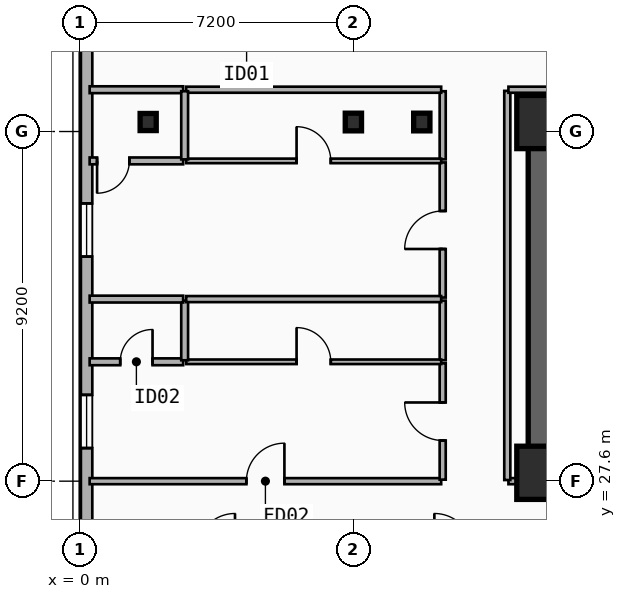
"""IFC4 building model, lengths in metres.
Left out: names, types, materials, properties, quantities, classifications, styles, units other than length and angle.
Written with IfcOpenShell. Run it as: python <this file> out.ifc"""

import sys

from ifc_helpers import new_model, si_unit, direction, frame, frame_2d, origin, origin_2d, place, context, subcontext, project, spatial, rectangle, i_section, extrude, element, fill, save


model = new_model("IFC4")
c1 = context("Model", 3, precision=1e-05, world=origin(), true_north=direction((0.0, 1.0)))
c2 = subcontext(c1, "Body", "Model", "MODEL_VIEW")
j1 = project(units=[si_unit("LENGTHUNIT", "METRE"), si_unit("PLANEANGLEUNIT", "RADIAN")], contexts=[c1])
p1 = place(None, origin())
s1 = spatial("IfcSite", under=j1, at=p1, CompositionType="ELEMENT")
p2 = place(p1, origin())
s2 = spatial("IfcBuilding", under=s1, at=p2, CompositionType="ELEMENT")
p3 = place(p2, frame((0.0, 0.0, 36.0)))
s3 = spatial("IfcBuildingStorey", under=s2, at=p3, CompositionType="ELEMENT", Elevation=36.0)
p4 = place(p3, frame((12.15, 37.05, 0.0), z_axis=(0.0, 0.0, 1.0), x_axis=(1.0, 0.0, 0.0)))
e1 = element("IfcWall", 1, at=p4, inside=s3, PredefinedType="SHEAR", context=c2, shape_type="SweptSolid", body=[
    extrude(rectangle(XDim=33.23, YDim=0.7, at=frame_2d((16.615, 0.0))), origin(), (0.0, 0.0, 1.0), 3.5),
])
p5 = place(p3, frame((21.18, 27.82, 0.0), z_axis=(0.0, 0.0, 1.0), x_axis=(-1.0, 0.0, 0.0)))
e2 = element("IfcWall", 2, at=p5, inside=s3, PredefinedType="SHEAR", context=c2, shape_type="SweptSolid", body=[
    extrude(rectangle(XDim=9.03, YDim=0.7, at=frame_2d((4.515, 0.0))), origin(), (0.0, 0.0, 1.0), 3.5),
])
p6 = place(p5, frame((2.68, 0.0, 0.0)))
e3 = element("IfcOpeningElement", 3, at=p6, cuts=e2, PredefinedType="OPENING", context=c2, shape_type="SweptSolid", body=[
    extrude(rectangle(XDim=1.1, YDim=2.15, at=frame_2d((0.55, 1.075))), frame((0.0, 0.36, 0.0), z_axis=(0.0, -1.0, 0.0), x_axis=(1.0, 0.0, 0.0)), (0.0, 0.0, 1.0), 0.72),
])
p7 = place(p3, frame((12.15, 28.17, 0.0), z_axis=(0.0, 0.0, 1.0), x_axis=(0.0, 1.0, 0.0)))
e4 = element("IfcWall", 4, at=p7, inside=s3, PredefinedType="SHEAR", context=c2, shape_type="SweptSolid", body=[
    extrude(rectangle(XDim=8.53, YDim=0.7, at=frame_2d((4.265, 0.0))), origin(), (0.0, 0.0, 1.0), 3.5),
])
for number, where, z_axis, x_axis in (
    (5, (12.2, 27.82, 0.0), (0.0, 0.0, 1.0), (1.0, 0.0, 0.0)),
    (6, (12.2, 37.05, 0.0), (0.0, 0.0, 1.0), (1.0, 0.0, 0.0)),
):
    element("IfcColumn", number, at=place(p3, frame(where, z_axis=z_axis, x_axis=x_axis)), inside=s3, PredefinedType="COLUMN", context=c2, shape_type="SweptSolid", body=[
        extrude(rectangle(XDim=1.4, YDim=1.4, at=origin_2d()), origin(), (0.0, 0.0, 1.0), 3.5),
    ])
p8 = place(p3, frame((9.0, 37.05, 0.0), z_axis=(0.0, 0.0, 1.0), x_axis=(1.0, 0.0, 0.0)))
e7 = element("IfcColumn", 7, at=p8, inside=s3, PredefinedType="COLUMN", context=c2, shape_type="SweptSolid", body=[
    extrude(i_section(OverallWidth=0.428, OverallDepth=0.465, WebThickness=0.045, FlangeThickness=0.073, FilletRadius=0.015, at=origin_2d()), origin(), (0.0, 0.0, 1.0), 3.5),
])
p9 = place(p3, frame((1.8, 37.05, 0.0), z_axis=(0.0, 0.0, 1.0), x_axis=(1.0, 0.0, 0.0)))
e8 = element("IfcColumn", 8, at=p9, inside=s3, PredefinedType="COLUMN", context=c2, shape_type="SweptSolid", body=[
    extrude(i_section(OverallWidth=0.424, OverallDepth=0.45, WebThickness=0.041, FlangeThickness=0.065, FilletRadius=0.015, at=origin_2d()), origin(), (0.0, 0.0, 1.0), 3.5),
])
p10 = place(p3, frame((7.2, 37.05, 0.0), z_axis=(0.0, 0.0, 1.0), x_axis=(1.0, 0.0, 0.0)))
e9 = element("IfcColumn", 9, at=p10, inside=s3, PredefinedType="COLUMN", context=c2, shape_type="SweptSolid", body=[
    extrude(i_section(OverallWidth=0.428, OverallDepth=0.465, WebThickness=0.045, FlangeThickness=0.073, FilletRadius=0.015, at=origin_2d()), origin(), (0.0, 0.0, 1.0), 3.5),
])
p11 = place(p3, frame((0.18, 25.8, 0.0), z_axis=(0.0, 0.0, 1.0), x_axis=(0.0, 1.0, 0.0)))
e10 = element("IfcWall", 10, at=p11, inside=s3, PredefinedType="SOLIDWALL", context=c2, shape_type="SweptSolid", body=[
    extrude(rectangle(XDim=15.2, YDim=0.3, at=frame_2d((7.6, 0.0))), origin(), (0.0, 0.0, 1.0), 3.24),
])
p12 = place(p11, frame((2.67, 0.0, 0.48)))
e11 = element("IfcOpeningElement", 11, at=p12, cuts=e10, PredefinedType="OPENING", context=c2, shape_type="SweptSolid", body=[
    extrude(rectangle(XDim=1.4, YDim=1.8, at=frame_2d((0.7, 0.9))), frame((0.0, 0.16, 0.0), z_axis=(0.0, -1.0, 0.0), x_axis=(1.0, 0.0, 0.0)), (0.0, 0.0, 1.0), 0.32),
])
p13 = place(p11, frame((7.709, 0.0, 0.48)))
e12 = element("IfcOpeningElement", 12, at=p13, cuts=e10, PredefinedType="OPENING", context=c2, shape_type="SweptSolid", body=[
    extrude(rectangle(XDim=1.4, YDim=1.8, at=frame_2d((0.7, 0.9))), frame((0.0, 0.16, 0.0), z_axis=(0.0, -1.0, 0.0), x_axis=(1.0, 0.0, 0.0)), (0.0, 0.0, 1.0), 0.32),
])
p14 = place(p3, frame((0.26, 27.6, 0.0), z_axis=(0.0, 0.0, 1.0), x_axis=(1.0, 0.0, 0.0)))
e13 = element("IfcWall", 13, at=p14, inside=s3, PredefinedType="PARTITIONING", context=c2, shape_type="SweptSolid", body=[
    extrude(rectangle(XDim=9.25, YDim=0.16, at=frame_2d((4.625, 0.0))), origin(), (0.0, 0.0, 1.0), 2.57),
])
p15 = place(p14, frame((4.125, 0.0, 0.0)))
e14 = element("IfcOpeningElement", 14, at=p15, cuts=e13, PredefinedType="OPENING", context=c2, shape_type="SweptSolid", body=[
    extrude(rectangle(XDim=1.0, YDim=2.15, at=frame_2d((0.5, 1.075))), frame((0.0, 0.09, 0.0), z_axis=(0.0, -1.0, 0.0), x_axis=(1.0, 0.0, 0.0)), (0.0, 0.0, 1.0), 0.18),
])
p16 = place(p3, frame((9.55, 27.64, 0.0), z_axis=(0.0, 0.0, 1.0), x_axis=(0.0, 1.0, 0.0)))
e15 = element("IfcWall", 15, at=p16, inside=s3, PredefinedType="PARTITIONING", context=c2, shape_type="SweptSolid", body=[
    extrude(rectangle(XDim=3.061, YDim=0.16, at=frame_2d((1.531, 0.0))), origin(), (0.0, 0.0, 1.0), 3.24),
])
p17 = place(p16, frame((1.031, 0.0, 0.0)))
e16 = element("IfcOpeningElement", 16, at=p17, cuts=e15, PredefinedType="OPENING", context=c2, shape_type="SweptSolid", body=[
    extrude(rectangle(XDim=1.0, YDim=2.15, at=frame_2d((0.5, 1.075))), frame((0.0, 0.09, 0.0), z_axis=(0.0, -1.0, 0.0), x_axis=(1.0, 0.0, 0.0)), (0.0, 0.0, 1.0), 0.18),
])
p18 = place(p3, frame((9.55, 30.781, 0.0), z_axis=(0.0, 0.0, 1.0), x_axis=(0.0, 1.0, 0.0)))
e17 = element("IfcWall", 17, at=p18, inside=s3, PredefinedType="PARTITIONING", context=c2, shape_type="SweptSolid", body=[
    extrude(rectangle(XDim=1.57, YDim=0.16, at=frame_2d((0.785, 0.0))), origin(), (0.0, 0.0, 1.0), 3.24),
])
p19 = place(p3, frame((9.55, 32.431, 0.0), z_axis=(0.0, 0.0, 1.0), x_axis=(0.0, 1.0, 0.0)))
e18 = element("IfcWall", 18, at=p19, inside=s3, PredefinedType="PARTITIONING", context=c2, shape_type="SweptSolid", body=[
    extrude(rectangle(XDim=3.556, YDim=0.16, at=frame_2d((1.778, 0.0))), origin(), (0.0, 0.0, 1.0), 3.24),
])
p20 = place(p19, frame((1.278, 0.0, 0.0)))
e19 = element("IfcOpeningElement", 19, at=p20, cuts=e18, PredefinedType="OPENING", context=c2, shape_type="SweptSolid", body=[
    extrude(rectangle(XDim=1.0, YDim=2.15, at=frame_2d((0.5, 1.075))), frame((0.0, 0.09, 0.0), z_axis=(0.0, -1.0, 0.0), x_axis=(1.0, 0.0, 0.0)), (0.0, 0.0, 1.0), 0.18),
])
p21 = place(p3, frame((9.55, 36.067, 0.0), z_axis=(0.0, 0.0, 1.0), x_axis=(0.0, 1.0, 0.0)))
e20 = element("IfcWall", 20, at=p21, inside=s3, PredefinedType="PARTITIONING", context=c2, shape_type="SweptSolid", body=[
    extrude(rectangle(XDim=1.793, YDim=0.16, at=frame_2d((0.896, 0.0))), origin(), (0.0, 0.0, 1.0), 2.72),
])
p22 = place(p3, frame((0.26, 37.9, 0.0), z_axis=(0.0, 0.0, 1.0), x_axis=(1.0, 0.0, 0.0)))
e21 = element("IfcWall", 21, at=p22, inside=s3, PredefinedType="PLUMBINGWALL", context=c2, shape_type="SweptSolid", body=[
    extrude(rectangle(XDim=2.46, YDim=0.18, at=frame_2d((1.23, 0.0))), origin(), (0.0, 0.0, 1.0), 3.24),
])
p23 = place(p3, frame((2.8, 37.9, 0.0), z_axis=(0.0, 0.0, 1.0), x_axis=(1.0, 0.0, 0.0)))
e22 = element("IfcWall", 22, at=p23, inside=s3, PredefinedType="PARTITIONING", context=c2, shape_type="SweptSolid", body=[
    extrude(rectangle(XDim=6.71, YDim=0.16, at=frame_2d((3.355, 0.0))), origin(), (0.0, 0.0, 1.0), 3.24),
])
p24 = place(p3, frame((0.26, 30.741, 0.0), z_axis=(0.0, 0.0, 1.0), x_axis=(1.0, 0.0, 0.0)))
e23 = element("IfcWall", 23, at=p24, inside=s3, PredefinedType="PLUMBINGWALL", context=c2, shape_type="SweptSolid", body=[
    extrude(rectangle(XDim=2.46, YDim=0.18, at=frame_2d((1.23, 0.0))), origin(), (0.0, 0.0, 1.0), 2.57),
])
p25 = place(p24, frame((0.805, 0.0, 0.0)))
e24 = element("IfcOpeningElement", 24, at=p25, cuts=e23, PredefinedType="OPENING", context=c2, shape_type="SweptSolid", body=[
    extrude(rectangle(XDim=0.85, YDim=2.1, at=frame_2d((0.425, 1.05))), frame((0.0, 0.1, 0.0), z_axis=(0.0, -1.0, 0.0), x_axis=(1.0, 0.0, 0.0)), (0.0, 0.0, 1.0), 0.2),
])
p26 = place(p3, frame((2.8, 30.741, 0.0), z_axis=(0.0, 0.0, 1.0), x_axis=(1.0, 0.0, 0.0)))
e25 = element("IfcWall", 25, at=p26, inside=s3, PredefinedType="PARTITIONING", context=c2, shape_type="SweptSolid", body=[
    extrude(rectangle(XDim=6.71, YDim=0.12, at=frame_2d((3.355, 0.0))), origin(), (0.0, 0.0, 1.0), 2.57),
])
p27 = place(p26, frame((2.905, 0.0, 0.0)))
e26 = element("IfcOpeningElement", 26, at=p27, cuts=e25, PredefinedType="OPENING", context=c2, shape_type="SweptSolid", body=[
    extrude(rectangle(XDim=0.9, YDim=2.1, at=frame_2d((0.45, 1.05))), frame((0.0, 0.07, 0.0), z_axis=(0.0, -1.0, 0.0), x_axis=(1.0, 0.0, 0.0)), (0.0, 0.0, 1.0), 0.14),
])
p28 = place(p3, frame((2.76, 30.781, 0.0), z_axis=(0.0, 0.0, 1.0), x_axis=(0.0, 1.0, 0.0)))
e27 = element("IfcWall", 27, at=p28, inside=s3, PredefinedType="PLUMBINGWALL", context=c2, shape_type="SweptSolid", body=[
    extrude(rectangle(XDim=1.57, YDim=0.18, at=frame_2d((0.785, 0.0))), origin(), (0.0, 0.0, 1.0), 3.24),
])
p29 = place(p3, frame((0.26, 32.391, 0.0), z_axis=(0.0, 0.0, 1.0), x_axis=(1.0, 0.0, 0.0)))
e28 = element("IfcWall", 28, at=p29, inside=s3, PredefinedType="PLUMBINGWALL", context=c2, shape_type="SweptSolid", body=[
    extrude(rectangle(XDim=2.46, YDim=0.18, at=frame_2d((1.23, 0.0))), origin(), (0.0, 0.0, 1.0), 2.57),
])
p30 = place(p3, frame((2.8, 32.391, 0.0), z_axis=(0.0, 0.0, 1.0), x_axis=(1.0, 0.0, 0.0)))
e29 = element("IfcWall", 29, at=p30, inside=s3, PredefinedType="PARTITIONING", context=c2, shape_type="SweptSolid", body=[
    extrude(rectangle(XDim=6.71, YDim=0.16, at=frame_2d((3.355, 0.0))), origin(), (0.0, 0.0, 1.0), 2.57),
])
p31 = place(p3, frame((2.72, 36.027, 0.0), z_axis=(0.0, 0.0, 1.0), x_axis=(-1.0, 0.0, 0.0)))
e30 = element("IfcWall", 30, at=p31, inside=s3, PredefinedType="PLUMBINGWALL", context=c2, shape_type="SweptSolid", body=[
    extrude(rectangle(XDim=2.46, YDim=0.18, at=frame_2d((1.23, 0.0))), origin(), (0.0, 0.0, 1.0), 2.57),
])
p32 = place(p31, frame((1.415, 0.0, 0.0)))
e31 = element("IfcOpeningElement", 31, at=p32, cuts=e30, PredefinedType="OPENING", context=c2, shape_type="SweptSolid", body=[
    extrude(rectangle(XDim=0.85, YDim=2.1, at=frame_2d((0.425, 1.05))), frame((0.0, 0.1, 0.0), z_axis=(0.0, -1.0, 0.0), x_axis=(1.0, 0.0, 0.0)), (0.0, 0.0, 1.0), 0.2),
])
p33 = place(p3, frame((2.8, 36.027, 0.0), z_axis=(0.0, 0.0, 1.0), x_axis=(1.0, 0.0, 0.0)))
e32 = element("IfcWall", 32, at=p33, inside=s3, PredefinedType="PARTITIONING", context=c2, shape_type="SweptSolid", body=[
    extrude(rectangle(XDim=6.71, YDim=0.12, at=frame_2d((3.355, 0.0))), origin(), (0.0, 0.0, 1.0), 2.57),
])
p34 = place(p33, frame((2.905, 0.0, 0.0)))
e33 = element("IfcOpeningElement", 33, at=p34, cuts=e32, PredefinedType="OPENING", context=c2, shape_type="SweptSolid", body=[
    extrude(rectangle(XDim=0.9, YDim=2.1, at=frame_2d((0.45, 1.05))), frame((0.0, 0.07, 0.0), z_axis=(0.0, -1.0, 0.0), x_axis=(1.0, 0.0, 0.0)), (0.0, 0.0, 1.0), 0.14),
])
p35 = place(p3, frame((2.76, 36.067, 0.0), z_axis=(0.0, 0.0, 1.0), x_axis=(0.0, 1.0, 0.0)))
e34 = element("IfcWall", 34, at=p35, inside=s3, PredefinedType="PLUMBINGWALL", context=c2, shape_type="SweptSolid", body=[
    extrude(rectangle(XDim=1.793, YDim=0.18, at=frame_2d((0.896, 0.0))), origin(), (0.0, 0.0, 1.0), 2.72),
])
p36 = place(p3, frame((11.28, 27.6, 0.0), z_axis=(0.0, 0.0, 1.0), x_axis=(1.0, 0.0, 0.0)))
e35 = element("IfcWall", 35, at=p36, inside=s3, PredefinedType="PARTITIONING", context=c2, shape_type="SweptSolid", body=[
    extrude(rectangle(XDim=0.84, YDim=0.16, at=frame_2d((0.42, 0.0))), origin(), (0.0, 0.0, 1.0), 2.28),
])
p37 = place(p3, frame((11.25, 27.63, 0.0), z_axis=(0.0, 0.0, 1.0), x_axis=(0.0, 1.0, 0.0)))
e36 = element("IfcWall", 36, at=p37, inside=s3, PredefinedType="PARTITIONING", context=c2, shape_type="SweptSolid", body=[
    extrude(rectangle(XDim=10.24, YDim=0.16, at=frame_2d((5.12, 0.0))), origin(), (0.0, 0.0, 1.0), 2.72),
])
p38 = place(p3, frame((11.28, 37.9, 0.0), z_axis=(0.0, 0.0, 1.0), x_axis=(1.0, 0.0, 0.0)))
e37 = element("IfcWall", 37, at=p38, inside=s3, PredefinedType="PARTITIONING", context=c2, shape_type="SweptSolid", body=[
    extrude(rectangle(XDim=35.04, YDim=0.16, at=frame_2d((17.52, 0.0))), origin(), (0.0, 0.0, 1.0), 3.24),
])
p39 = place(p12, origin())
e38 = element("IfcWindow", 38, at=p39, inside=s3, PartitioningType="SINGLE_PANEL", PredefinedType="WINDOW", context=c2, shape_type="SweptSolid", body=[
    extrude(rectangle(XDim=1.4, YDim=1.8, at=frame_2d((0.7, 0.9))), frame((0.0, 0.03, 0.0), z_axis=(0.0, -1.0, 0.0), x_axis=(1.0, 0.0, 0.0)), (0.0, 0.0, 1.0), 0.06),
])
fill(e11, e38)
p40 = place(p13, origin())
e39 = element("IfcWindow", 39, at=p40, inside=s3, PartitioningType="SINGLE_PANEL", PredefinedType="WINDOW", context=c2, shape_type="SweptSolid", body=[
    extrude(rectangle(XDim=1.4, YDim=1.8, at=frame_2d((0.7, 0.9))), frame((0.0, 0.03, 0.0), z_axis=(0.0, -1.0, 0.0), x_axis=(1.0, 0.0, 0.0)), (0.0, 0.0, 1.0), 0.06),
])
fill(e12, e39)
p41 = place(p15, origin())
e40 = element("IfcDoor", 40, at=p41, inside=s3, OperationType="SINGLE_SWING_RIGHT", PredefinedType="DOOR", context=c2, shape_type="SweptSolid", body=[
    extrude(rectangle(XDim=1.0, YDim=2.15, at=frame_2d((0.5, 1.075))), frame((0.0, 0.025, 0.0), z_axis=(0.0, -1.0, 0.0), x_axis=(1.0, 0.0, 0.0)), (0.0, 0.0, 1.0), 0.05),
])
fill(e14, e40)
p42 = place(p17, origin())
e41 = element("IfcDoor", 41, at=p42, inside=s3, OperationType="SINGLE_SWING_RIGHT", PredefinedType="DOOR", context=c2, shape_type="SweptSolid", body=[
    extrude(rectangle(XDim=1.0, YDim=2.15, at=frame_2d((0.5, 1.075))), frame((0.0, 0.025, 0.0), z_axis=(0.0, -1.0, 0.0), x_axis=(1.0, 0.0, 0.0)), (0.0, 0.0, 1.0), 0.05),
])
fill(e16, e41)
p43 = place(p20, origin())
e42 = element("IfcDoor", 42, at=p43, inside=s3, OperationType="SINGLE_SWING_LEFT", PredefinedType="DOOR", context=c2, shape_type="SweptSolid", body=[
    extrude(rectangle(XDim=1.0, YDim=2.15, at=frame_2d((0.5, 1.075))), frame((0.0, 0.025, 0.0), z_axis=(0.0, -1.0, 0.0), x_axis=(1.0, 0.0, 0.0)), (0.0, 0.0, 1.0), 0.05),
])
fill(e19, e42)
p44 = place(p25, origin())
e43 = element("IfcDoor", 43, at=p44, inside=s3, OperationType="SINGLE_SWING_RIGHT", PredefinedType="DOOR", context=c2, shape_type="SweptSolid", body=[
    extrude(rectangle(XDim=0.85, YDim=2.1, at=frame_2d((0.425, 1.05))), frame((0.0, 0.025, 0.0), z_axis=(0.0, -1.0, 0.0), x_axis=(1.0, 0.0, 0.0)), (0.0, 0.0, 1.0), 0.05),
])
fill(e24, e43)
p45 = place(p27, origin())
e44 = element("IfcDoor", 44, at=p45, inside=s3, OperationType="SINGLE_SWING_LEFT", PredefinedType="DOOR", context=c2, shape_type="SweptSolid", body=[
    extrude(rectangle(XDim=0.9, YDim=2.1, at=frame_2d((0.45, 1.05))), frame((0.0, 0.025, 0.0), z_axis=(0.0, -1.0, 0.0), x_axis=(1.0, 0.0, 0.0)), (0.0, 0.0, 1.0), 0.05),
])
fill(e26, e44)
p46 = place(p32, origin())
e45 = element("IfcDoor", 45, at=p46, inside=s3, OperationType="SINGLE_SWING_RIGHT", PredefinedType="DOOR", context=c2, shape_type="SweptSolid", body=[
    extrude(rectangle(XDim=0.85, YDim=2.1, at=frame_2d((0.425, 1.05))), frame((0.0, 0.025, 0.0), z_axis=(0.0, -1.0, 0.0), x_axis=(1.0, 0.0, 0.0)), (0.0, 0.0, 1.0), 0.05),
])
fill(e31, e45)
p47 = place(p34, origin())
e46 = element("IfcDoor", 46, at=p47, inside=s3, OperationType="SINGLE_SWING_LEFT", PredefinedType="DOOR", context=c2, shape_type="SweptSolid", body=[
    extrude(rectangle(XDim=0.9, YDim=2.1, at=frame_2d((0.45, 1.05))), frame((0.0, 0.025, 0.0), z_axis=(0.0, -1.0, 0.0), x_axis=(1.0, 0.0, 0.0)), (0.0, 0.0, 1.0), 0.05),
])
fill(e33, e46)
save(model, sys.argv[1])
